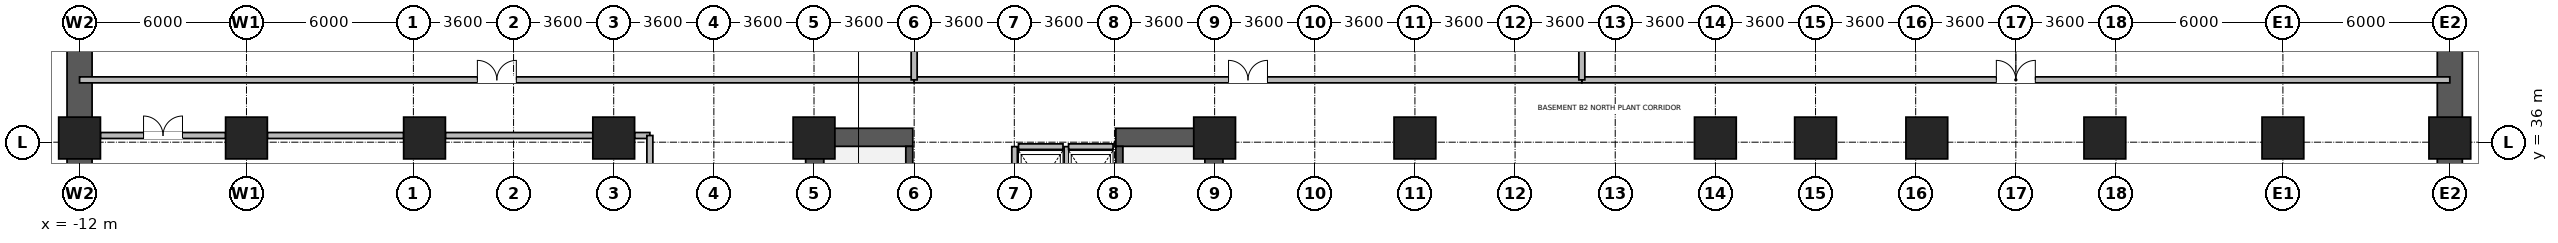
"""IFC4 building model, lengths in metres.
Left out: names, types, materials, properties, quantities, classifications, styles, units other than length and angle.
Written with IfcOpenShell. Run it as: python <this file> out.ifc"""

import sys

from ifc_helpers import new_model, si_unit, direction, frame, frame_2d, origin, origin_2d, place, context, subcontext, project, spatial, rectangle, extrude, source, transform, mapped, element, fill, save


model = new_model("IFC4")
c1 = context("Model", 3, precision=1e-05, world=origin(), true_north=direction((0.0, 1.0)))
c2 = subcontext(c1, "Body", "Model", "MODEL_VIEW")
j1 = project(units=[si_unit("LENGTHUNIT", "METRE"), si_unit("PLANEANGLEUNIT", "RADIAN")], contexts=[c1])
p1 = place(None, origin())
s1 = spatial("IfcSite", under=j1, at=p1, CompositionType="ELEMENT")
p2 = place(p1, origin())
s2 = spatial("IfcBuilding", under=s1, at=p2, CompositionType="ELEMENT")
p3 = place(p2, frame((0.0, 0.0, -9.0)))
s3 = spatial("IfcBuildingStorey", under=s2, at=p3, CompositionType="ELEMENT", Elevation=-9.0)
for number, where, z_axis, x_axis in (
    (1, (-12.0, 2.25, 0.0), (0.0, 0.0, 1.0), (0.0, 1.0, 0.0)),
    (2, (73.2, 2.25, 0.0), (0.0, 0.0, 1.0), (0.0, 1.0, 0.0)),
):
    element("IfcWall", number, at=place(p3, frame(where, z_axis=z_axis, x_axis=x_axis)), inside=s3, PredefinedType="USERDEFINED", context=c2, shape_type="SweptSolid", body=[
        extrude(rectangle(XDim=42.15, YDim=0.9, at=frame_2d((21.075, 0.0))), origin(), (0.0, 0.0, 1.0), 4.18),
    ])
for number, where, z_axis, x_axis in (
    (3, (14.425, 28.2, 0.0), (0.0, 0.0, 1.0), (0.0, 1.0, 0.0)),
    (4, (28.775, 28.2, 0.0), (0.0, 0.0, 1.0), (0.0, 1.0, 0.0)),
):
    element("IfcWall", number, at=place(p3, frame(where, z_axis=z_axis, x_axis=x_axis)), inside=s3, PredefinedType="SHEAR", context=c2, shape_type="SweptSolid", body=[
        extrude(rectangle(XDim=8.3, YDim=0.65, at=frame_2d((4.15, 0.0))), origin(), (0.0, 0.0, 1.0), 4.18),
    ])
for number, where, z_axis, x_axis in (
    (5, (14.75, 36.175, 0.0), (0.0, 0.0, 1.0), (1.0, 0.0, 0.0)),
    (6, (25.25, 36.175, 0.0), (0.0, 0.0, 1.0), (1.0, 0.0, 0.0)),
):
    element("IfcWall", number, at=place(p3, frame(where, z_axis=z_axis, x_axis=x_axis)), inside=s3, PredefinedType="SHEAR", context=c2, shape_type="SweptSolid", body=[
        extrude(rectangle(XDim=3.2, YDim=0.65, at=frame_2d((1.6, 0.0))), origin(), (0.0, 0.0, 1.0), 4.18),
    ])
p4 = place(p3, frame((17.825, 28.85, 0.0), z_axis=(0.0, 0.0, 1.0), x_axis=(0.0, 1.0, 0.0)))
e7 = element("IfcWall", 7, at=p4, inside=s3, PredefinedType="SHEAR", context=c2, shape_type="SweptSolid", body=[
    extrude(rectangle(XDim=7.0, YDim=0.25, at=frame_2d((3.5, 0.0))), origin(), (0.0, 0.0, 1.0), 4.18),
])
p5 = place(p4, frame((0.15, 0.0, 0.0)))
e8 = element("IfcOpeningElement", 8, at=p5, cuts=e7, PredefinedType="OPENING", context=c2, shape_type="SweptSolid", body=[
    extrude(rectangle(XDim=1.1, YDim=2.08, at=frame_2d((0.55, 1.04))), frame((0.0, 0.135, 0.0), z_axis=(0.0, -1.0, 0.0), x_axis=(1.0, 0.0, 0.0)), (0.0, 0.0, 1.0), 0.27),
])
p6 = place(p3, frame((25.375, 28.85, 0.0), z_axis=(0.0, 0.0, 1.0), x_axis=(0.0, 1.0, 0.0)))
e9 = element("IfcWall", 9, at=p6, inside=s3, PredefinedType="SHEAR", context=c2, shape_type="SweptSolid", body=[
    extrude(rectangle(XDim=7.0, YDim=0.25, at=frame_2d((3.5, 0.0))), origin(), (0.0, 0.0, 1.0), 4.18),
])
p7 = place(p6, frame((0.15, 0.0, 0.0)))
e10 = element("IfcOpeningElement", 10, at=p7, cuts=e9, PredefinedType="OPENING", context=c2, shape_type="SweptSolid", body=[
    extrude(rectangle(XDim=1.1, YDim=2.08, at=frame_2d((0.55, 1.04))), frame((0.0, 0.135, 0.0), z_axis=(0.0, -1.0, 0.0), x_axis=(1.0, 0.0, 0.0)), (0.0, 0.0, 1.0), 0.27),
])
m1 = source(origin(), c2, "Body", "SweptSolid", [
    extrude(rectangle(XDim=1.5, YDim=1.5, at=origin_2d()), origin(), (0.0, 0.0, 1.0), 4.5),
])
for number, where, z_axis, x_axis in (
    (11, (7.2, 36.15, 0.0), (0.0, 0.0, 1.0), (1.0, 0.0, 0.0)),
    (12, (14.4, 36.15, 0.0), (0.0, 0.0, 1.0), (1.0, 0.0, 0.0)),
    (13, (28.8, 36.15, 0.0), (0.0, 0.0, 1.0), (1.0, 0.0, 0.0)),
    (14, (36.0, 36.15, 0.0), (0.0, 0.0, 1.0), (1.0, 0.0, 0.0)),
    (15, (46.8, 36.15, 0.0), (0.0, 0.0, 1.0), (1.0, 0.0, 0.0)),
    (16, (50.4, 36.15, 0.0), (0.0, 0.0, 1.0), (1.0, 0.0, 0.0)),
    (17, (54.4, 36.15, 0.0), (0.0, 0.0, 1.0), (1.0, 0.0, 0.0)),
    (18, (0.4, 36.15, 0.0), (0.0, 0.0, 1.0), (1.0, 0.0, 0.0)),
    (19, (60.8, 36.15, 0.0), (0.0, 0.0, 1.0), (1.0, 0.0, 0.0)),
    (20, (-12.0, 36.15, 0.0), (0.0, 0.0, 1.0), (1.0, 0.0, 0.0)),
    (21, (-6.0, 36.15, 0.0), (0.0, 0.0, 1.0), (1.0, 0.0, 0.0)),
    (22, (67.2, 36.15, 0.0), (0.0, 0.0, 1.0), (1.0, 0.0, 0.0)),
    (23, (73.2, 36.15, 0.0), (0.0, 0.0, 1.0), (1.0, 0.0, 0.0)),
):
    element("IfcColumn", number, at=place(p3, frame(where, z_axis=z_axis, x_axis=x_axis)), inside=s3, PredefinedType="COLUMN", context=c2, shape_type="MappedRepresentation", body=[
        mapped(m1, transform((0.0, 0.0, 0.0), x_axis=(1.0, 0.0, 0.0), y_axis=(0.0, 1.0, 0.0), z_axis=(0.0, 0.0, 1.0), scale=1.0)),
    ])
p8 = place(p3, frame((21.75, 35.84, 0.0), z_axis=(0.0, 0.0, 1.0), x_axis=(1.0, 0.0, 0.0)))
e24 = element("IfcWall", 24, at=p8, inside=s3, PredefinedType="PARTITIONING", context=c2, shape_type="SweptSolid", body=[
    extrude(rectangle(XDim=1.6, YDim=0.2, at=frame_2d((0.8, 0.0))), origin(), (0.0, 0.0, 1.0), 2.96),
])
for number, where, z_axis, x_axis in (
    (25, (21.61, 33.16, 0.0), (0.0, 0.0, 1.0), (0.0, 1.0, 0.0)),
    (26, (23.49, 33.16, 0.0), (0.0, 0.0, 1.0), (0.0, 1.0, 0.0)),
):
    element("IfcWall", number, at=place(p3, frame(where, z_axis=z_axis, x_axis=x_axis)), inside=s3, PredefinedType="PARTITIONING", context=c2, shape_type="SweptSolid", body=[
        extrude(rectangle(XDim=2.68, YDim=0.2, at=frame_2d((1.34, 0.0))), origin(), (0.0, 0.0, 1.0), 4.16),
    ])
p9 = place(p3, frame((23.55, 35.84, 0.0), z_axis=(0.0, 0.0, 1.0), x_axis=(1.0, 0.0, 0.0)))
e27 = element("IfcWall", 27, at=p9, inside=s3, PredefinedType="PARTITIONING", context=c2, shape_type="SweptSolid", body=[
    extrude(rectangle(XDim=1.6, YDim=0.2, at=frame_2d((0.8, 0.0))), origin(), (0.0, 0.0, 1.0), 2.96),
])
p10 = place(p3, frame((42.0, 38.24, 0.0), z_axis=(0.0, 0.0, 1.0), x_axis=(1.0, 0.0, 0.0)))
e28 = element("IfcWall", 28, at=p10, inside=s3, PredefinedType="PARTITIONING", context=c2, shape_type="SweptSolid", body=[
    extrude(rectangle(XDim=31.2, YDim=0.215, at=frame_2d((15.6, 0.0))), origin(), (0.0, 0.0, 1.0), 4.16),
])
p11 = place(p10, frame((14.9, 0.0, 0.0)))
e29 = element("IfcOpeningElement", 29, at=p11, cuts=e28, PredefinedType="OPENING", context=c2, shape_type="SweptSolid", body=[
    extrude(rectangle(XDim=1.4, YDim=2.15, at=frame_2d((0.7, 1.075))), frame((0.0, 0.118, 0.0), z_axis=(0.0, -1.0, 0.0), x_axis=(1.0, 0.0, 0.0)), (0.0, 0.0, 1.0), 0.235),
])
p12 = place(p3, frame((-12.0, 38.24, 0.0), z_axis=(0.0, 0.0, 1.0), x_axis=(1.0, 0.0, 0.0)))
e30 = element("IfcWall", 30, at=p12, inside=s3, PredefinedType="PARTITIONING", context=c2, shape_type="SweptSolid", body=[
    extrude(rectangle(XDim=30.0, YDim=0.215, at=frame_2d((15.0, 0.0))), origin(), (0.0, 0.0, 1.0), 4.16),
])
p13 = place(p12, frame((14.3, 0.0, 0.0)))
e31 = element("IfcOpeningElement", 31, at=p13, cuts=e30, PredefinedType="OPENING", context=c2, shape_type="SweptSolid", body=[
    extrude(rectangle(XDim=1.4, YDim=2.15, at=frame_2d((0.7, 1.075))), frame((0.0, 0.118, 0.0), z_axis=(0.0, -1.0, 0.0), x_axis=(1.0, 0.0, 0.0)), (0.0, 0.0, 1.0), 0.235),
])
p14 = place(p3, frame((18.0, 38.24, 0.0), z_axis=(0.0, 0.0, 1.0), x_axis=(1.0, 0.0, 0.0)))
e32 = element("IfcWall", 32, at=p14, inside=s3, PredefinedType="PARTITIONING", context=c2, shape_type="SweptSolid", body=[
    extrude(rectangle(XDim=24.0, YDim=0.215, at=frame_2d((12.0, 0.0))), origin(), (0.0, 0.0, 1.0), 4.16),
])
p15 = place(p14, frame((11.3, 0.0, 0.0)))
e33 = element("IfcOpeningElement", 33, at=p15, cuts=e32, PredefinedType="OPENING", context=c2, shape_type="SweptSolid", body=[
    extrude(rectangle(XDim=1.4, YDim=2.15, at=frame_2d((0.7, 1.075))), frame((0.0, 0.118, 0.0), z_axis=(0.0, -1.0, 0.0), x_axis=(1.0, 0.0, 0.0)), (0.0, 0.0, 1.0), 0.235),
])
p16 = place(p3, frame((-11.25, 36.24, 0.0), z_axis=(0.0, 0.0, 1.0), x_axis=(1.0, 0.0, 0.0)))
e34 = element("IfcWall", 34, at=p16, inside=s3, PredefinedType="PARTITIONING", context=c2, shape_type="SweptSolid", body=[
    extrude(rectangle(XDim=4.5, YDim=0.215, at=frame_2d((2.25, 0.0))), origin(), (0.0, 0.0, 1.0), 3.46),
])
p17 = place(p16, frame((1.55, 0.0, 0.0)))
e35 = element("IfcOpeningElement", 35, at=p17, cuts=e34, PredefinedType="OPENING", context=c2, shape_type="SweptSolid", body=[
    extrude(rectangle(XDim=1.4, YDim=2.15, at=frame_2d((0.7, 1.075))), frame((0.0, 0.118, 0.0), z_axis=(0.0, -1.0, 0.0), x_axis=(1.0, 0.0, 0.0)), (0.0, 0.0, 1.0), 0.235),
])
p18 = place(p3, frame((-5.25, 36.24, 0.0), z_axis=(0.0, 0.0, 1.0), x_axis=(1.0, 0.0, 0.0)))
e36 = element("IfcWall", 36, at=p18, inside=s3, PredefinedType="PARTITIONING", context=c2, shape_type="SweptSolid", body=[
    extrude(rectangle(XDim=4.9, YDim=0.215, at=frame_2d((2.45, 0.0))), origin(), (0.0, 0.0, 1.0), 3.46),
])
p19 = place(p3, frame((1.15, 36.24, 0.0), z_axis=(0.0, 0.0, 1.0), x_axis=(1.0, 0.0, 0.0)))
e37 = element("IfcWall", 37, at=p19, inside=s3, PredefinedType="PARTITIONING", context=c2, shape_type="SweptSolid", body=[
    extrude(rectangle(XDim=5.3, YDim=0.215, at=frame_2d((2.65, 0.0))), origin(), (0.0, 0.0, 1.0), 3.46),
])
p20 = place(p3, frame((7.95, 36.24, 0.0), z_axis=(0.0, 0.0, 1.0), x_axis=(1.0, 0.0, 0.0)))
e38 = element("IfcWall", 38, at=p20, inside=s3, PredefinedType="PARTITIONING", context=c2, shape_type="SweptSolid", body=[
    extrude(rectangle(XDim=0.55, YDim=0.215, at=frame_2d((0.275, 0.0))), origin(), (0.0, 0.0, 1.0), 3.46),
])
p21 = place(p3, frame((8.5, 28.56, 0.0), z_axis=(0.0, 0.0, 1.0), x_axis=(0.0, 1.0, 0.0)))
e39 = element("IfcWall", 39, at=p21, inside=s3, PredefinedType="PARTITIONING", context=c2, shape_type="SweptSolid", body=[
    extrude(rectangle(XDim=7.68, YDim=0.215, at=frame_2d((3.84, 0.0))), origin(), (0.0, 0.0, 1.0), 4.16),
])
for number, where, z_axis, x_axis in (
    (40, (18.0, 38.24, 0.0), (0.0, 0.0, 1.0), (0.0, 1.0, 0.0)),
    (41, (42.0, 38.24, 0.0), (0.0, 0.0, 1.0), (0.0, 1.0, 0.0)),
):
    element("IfcWall", number, at=place(p3, frame(where, z_axis=z_axis, x_axis=x_axis)), inside=s3, PredefinedType="PARTITIONING", context=c2, shape_type="SweptSolid", body=[
        extrude(rectangle(XDim=6.6, YDim=0.215, at=frame_2d((3.3, 0.0))), origin(), (0.0, 0.0, 1.0), 4.16),
    ])
p22 = place(p11, origin())
e42 = element("IfcDoor", 42, at=p22, inside=s3, OperationType="DOUBLE_DOOR_SINGLE_SWING", PredefinedType="DOOR", context=c2, shape_type="SweptSolid", body=[
    extrude(rectangle(XDim=1.4, YDim=2.15, at=frame_2d((0.7, 1.075))), frame((0.0, 0.025, 0.0), z_axis=(0.0, -1.0, 0.0), x_axis=(1.0, 0.0, 0.0)), (0.0, 0.0, 1.0), 0.05),
])
fill(e29, e42)
p23 = place(p13, origin())
e43 = element("IfcDoor", 43, at=p23, inside=s3, OperationType="DOUBLE_DOOR_SINGLE_SWING", PredefinedType="DOOR", context=c2, shape_type="SweptSolid", body=[
    extrude(rectangle(XDim=1.4, YDim=2.15, at=frame_2d((0.7, 1.075))), frame((0.0, 0.025, 0.0), z_axis=(0.0, -1.0, 0.0), x_axis=(1.0, 0.0, 0.0)), (0.0, 0.0, 1.0), 0.05),
])
fill(e31, e43)
p24 = place(p15, origin())
e44 = element("IfcDoor", 44, at=p24, inside=s3, OperationType="DOUBLE_DOOR_SINGLE_SWING", PredefinedType="DOOR", context=c2, shape_type="SweptSolid", body=[
    extrude(rectangle(XDim=1.4, YDim=2.15, at=frame_2d((0.7, 1.075))), frame((0.0, 0.025, 0.0), z_axis=(0.0, -1.0, 0.0), x_axis=(1.0, 0.0, 0.0)), (0.0, 0.0, 1.0), 0.05),
])
fill(e33, e44)
p25 = place(p17, origin())
e45 = element("IfcDoor", 45, at=p25, inside=s3, OperationType="DOUBLE_DOOR_SINGLE_SWING", PredefinedType="DOOR", context=c2, shape_type="SweptSolid", body=[
    extrude(rectangle(XDim=1.4, YDim=2.15, at=frame_2d((0.7, 1.075))), frame((0.0, 0.025, 0.0), z_axis=(0.0, -1.0, 0.0), x_axis=(1.0, 0.0, 0.0)), (0.0, 0.0, 1.0), 0.05),
])
fill(e35, e45)
save(model, sys.argv[1])
